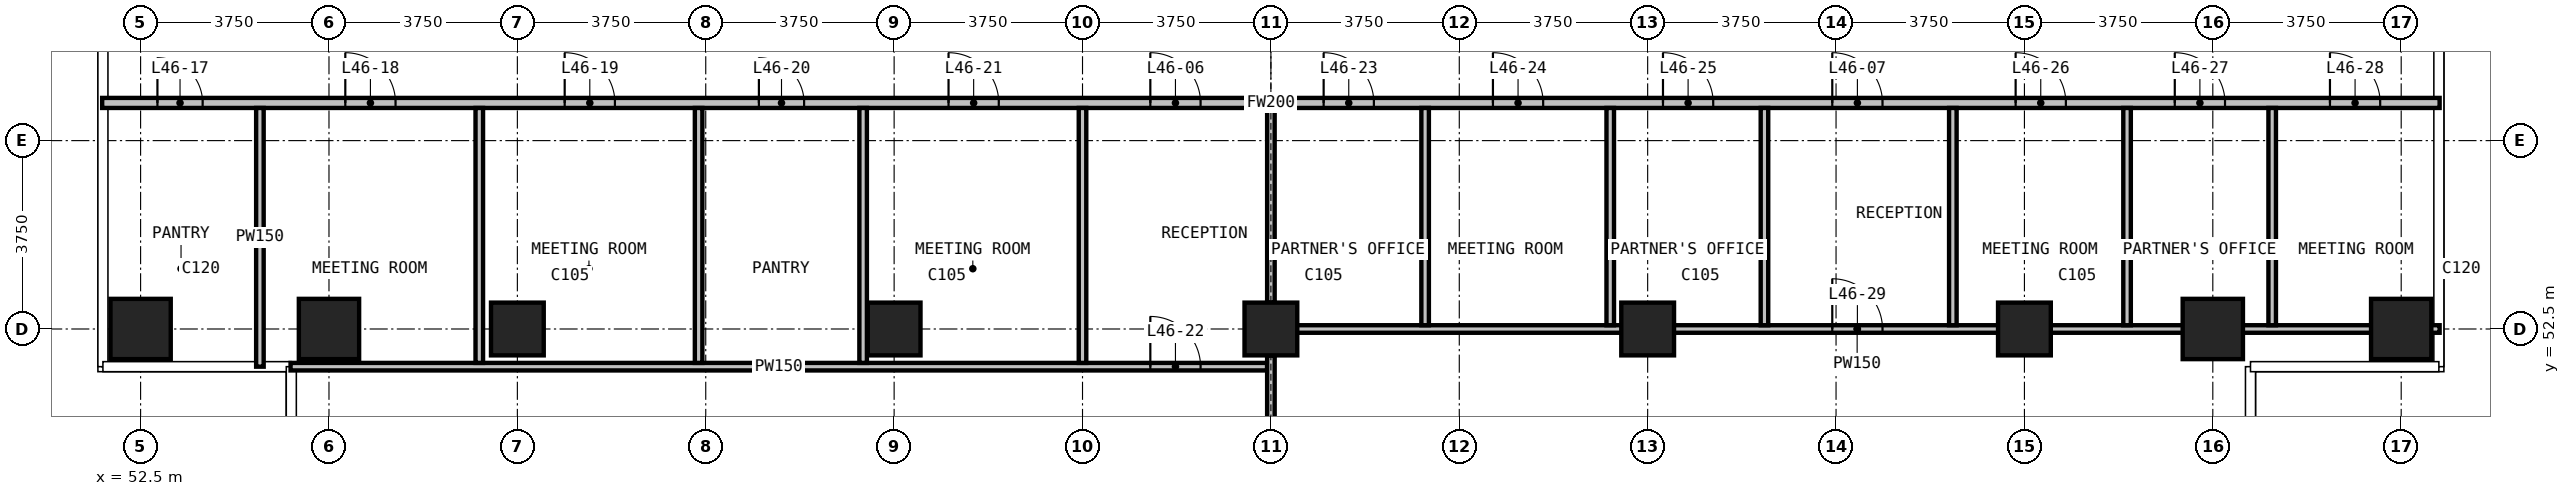
"""IFC4 building model, lengths in metres.
Left out: names, types, materials, properties, quantities, classifications, styles, units other than length and angle.
Written with IfcOpenShell. Run it as: python <this file> out.ifc"""

import sys

from ifc_helpers import new_model, si_unit, direction, frame, frame_2d, origin, origin_2d, place, context, subcontext, project, spatial, rectangle, extrude, element, fill, save


model = new_model("IFC4")
c1 = context("Model", 3, precision=1e-05, world=origin(), true_north=direction((0.0, 1.0)))
c2 = subcontext(c1, "Body", "Model", "MODEL_VIEW")
j1 = project(units=[si_unit("LENGTHUNIT", "METRE"), si_unit("PLANEANGLEUNIT", "RADIAN")], contexts=[c1])
p1 = place(None, origin())
s1 = spatial("IfcSite", under=j1, at=p1, CompositionType="ELEMENT")
p2 = place(p1, origin())
s2 = spatial("IfcBuilding", under=s1, at=p2, CompositionType="ELEMENT")
p3 = place(p2, frame((0.0, 0.0, 180.1)))
s3 = spatial("IfcBuildingStorey", under=s2, at=p3, CompositionType="ELEMENT", Elevation=180.1)
for number, where, z_axis, x_axis in (
    (1, (52.5, 52.5, 0.0), (0.0, 0.0, 1.0), (1.0, 0.0, 0.0)),
    (2, (56.25, 52.5, 0.0), (0.0, 0.0, 1.0), (1.0, 0.0, 0.0)),
):
    element("IfcColumn", number, at=place(p3, frame(where, z_axis=z_axis, x_axis=x_axis)), inside=s3, PredefinedType="COLUMN", context=c2, shape_type="SweptSolid", body=[
        extrude(rectangle(XDim=1.2, YDim=1.2, at=origin_2d()), origin(), (0.0, 0.0, 1.0), 3.6),
    ])
for number, where, z_axis, x_axis in (
    (3, (60.0, 52.5, 0.0), (0.0, 0.0, 1.0), (1.0, 0.0, 0.0)),
    (4, (67.5, 52.5, 0.0), (0.0, 0.0, 1.0), (1.0, 0.0, 0.0)),
    (5, (75.0, 52.5, 0.0), (0.0, 0.0, 1.0), (1.0, 0.0, 0.0)),
    (6, (82.5, 52.5, 0.0), (0.0, 0.0, 1.0), (1.0, 0.0, 0.0)),
    (7, (90.0, 52.5, 0.0), (0.0, 0.0, 1.0), (1.0, 0.0, 0.0)),
):
    element("IfcColumn", number, at=place(p3, frame(where, z_axis=z_axis, x_axis=x_axis)), inside=s3, PredefinedType="COLUMN", context=c2, shape_type="SweptSolid", body=[
        extrude(rectangle(XDim=1.05, YDim=1.05, at=origin_2d()), origin(), (0.0, 0.0, 1.0), 3.6),
    ])
for number, where, z_axis, x_axis in (
    (8, (93.75, 52.5, 0.0), (0.0, 0.0, 1.0), (1.0, 0.0, 0.0)),
    (9, (97.5, 52.5, 0.0), (0.0, 0.0, 1.0), (1.0, 0.0, 0.0)),
):
    element("IfcColumn", number, at=place(p3, frame(where, z_axis=z_axis, x_axis=x_axis)), inside=s3, PredefinedType="COLUMN", context=c2, shape_type="SweptSolid", body=[
        extrude(rectangle(XDim=1.2, YDim=1.2, at=origin_2d()), origin(), (0.0, 0.0, 1.0), 3.6),
    ])
p4 = place(p3, frame((51.735, 57.0, 0.0), z_axis=(0.0, 0.0, 1.0), x_axis=(1.0, 0.0, 0.0)))
e10 = element("IfcWall", 10, at=p4, inside=s3, PredefinedType="PARTITIONING", context=c2, shape_type="SweptSolid", body=[
    extrude(rectangle(XDim=46.53, YDim=0.2, at=frame_2d((23.265, 0.0))), origin(), (0.0, 0.0, 1.0), 3.25),
])
p5 = place(p4, frame((20.865, 0.0, 0.0)))
e11 = element("IfcOpeningElement", 11, at=p5, cuts=e10, PredefinedType="OPENING", context=c2, shape_type="SweptSolid", body=[
    extrude(rectangle(XDim=1.0, YDim=2.2, at=frame_2d((0.5, 1.1))), frame((0.0, 0.11, 0.0), z_axis=(0.0, -1.0, 0.0), x_axis=(1.0, 0.0, 0.0)), (0.0, 0.0, 1.0), 0.22),
])
p6 = place(p4, frame((34.44, 0.0, 0.0)))
e12 = element("IfcOpeningElement", 12, at=p6, cuts=e10, PredefinedType="OPENING", context=c2, shape_type="SweptSolid", body=[
    extrude(rectangle(XDim=1.0, YDim=2.2, at=frame_2d((0.5, 1.1))), frame((0.0, 0.11, 0.0), z_axis=(0.0, -1.0, 0.0), x_axis=(1.0, 0.0, 0.0)), (0.0, 0.0, 1.0), 0.22),
])
p7 = place(p4, frame((1.1, 0.0, 0.0)))
e13 = element("IfcOpeningElement", 13, at=p7, cuts=e10, PredefinedType="OPENING", context=c2, shape_type="SweptSolid", body=[
    extrude(rectangle(XDim=0.9, YDim=2.2, at=frame_2d((0.45, 1.1))), frame((0.0, 0.11, 0.0), z_axis=(0.0, -1.0, 0.0), x_axis=(1.0, 0.0, 0.0)), (0.0, 0.0, 1.0), 0.22),
])
p8 = place(p4, frame((4.84, 0.0, 0.0)))
e14 = element("IfcOpeningElement", 14, at=p8, cuts=e10, PredefinedType="OPENING", context=c2, shape_type="SweptSolid", body=[
    extrude(rectangle(XDim=1.0, YDim=2.2, at=frame_2d((0.5, 1.1))), frame((0.0, 0.11, 0.0), z_axis=(0.0, -1.0, 0.0), x_axis=(1.0, 0.0, 0.0)), (0.0, 0.0, 1.0), 0.22),
])
p9 = place(p4, frame((9.207, 0.0, 0.0)))
e15 = element("IfcOpeningElement", 15, at=p9, cuts=e10, PredefinedType="OPENING", context=c2, shape_type="SweptSolid", body=[
    extrude(rectangle(XDim=1.0, YDim=2.2, at=frame_2d((0.5, 1.1))), frame((0.0, 0.11, 0.0), z_axis=(0.0, -1.0, 0.0), x_axis=(1.0, 0.0, 0.0)), (0.0, 0.0, 1.0), 0.22),
])
p10 = place(p4, frame((13.073, 0.0, 0.0)))
e16 = element("IfcOpeningElement", 16, at=p10, cuts=e10, PredefinedType="OPENING", context=c2, shape_type="SweptSolid", body=[
    extrude(rectangle(XDim=0.9, YDim=2.2, at=frame_2d((0.45, 1.1))), frame((0.0, 0.11, 0.0), z_axis=(0.0, -1.0, 0.0), x_axis=(1.0, 0.0, 0.0)), (0.0, 0.0, 1.0), 0.22),
])
p11 = place(p4, frame((16.848, 0.0, 0.0)))
e17 = element("IfcOpeningElement", 17, at=p11, cuts=e10, PredefinedType="OPENING", context=c2, shape_type="SweptSolid", body=[
    extrude(rectangle(XDim=1.0, YDim=2.2, at=frame_2d((0.5, 1.1))), frame((0.0, 0.11, 0.0), z_axis=(0.0, -1.0, 0.0), x_axis=(1.0, 0.0, 0.0)), (0.0, 0.0, 1.0), 0.22),
])
p12 = place(p4, frame((24.315, 0.0, 0.0)))
e18 = element("IfcOpeningElement", 18, at=p12, cuts=e10, PredefinedType="OPENING", context=c2, shape_type="SweptSolid", body=[
    extrude(rectangle(XDim=1.0, YDim=2.2, at=frame_2d((0.5, 1.1))), frame((0.0, 0.11, 0.0), z_axis=(0.0, -1.0, 0.0), x_axis=(1.0, 0.0, 0.0)), (0.0, 0.0, 1.0), 0.22),
])
p13 = place(p4, frame((27.685, 0.0, 0.0)))
e19 = element("IfcOpeningElement", 19, at=p13, cuts=e10, PredefinedType="OPENING", context=c2, shape_type="SweptSolid", body=[
    extrude(rectangle(XDim=1.0, YDim=2.2, at=frame_2d((0.5, 1.1))), frame((0.0, 0.11, 0.0), z_axis=(0.0, -1.0, 0.0), x_axis=(1.0, 0.0, 0.0)), (0.0, 0.0, 1.0), 0.22),
])
p14 = place(p4, frame((31.07, 0.0, 0.0)))
e20 = element("IfcOpeningElement", 20, at=p14, cuts=e10, PredefinedType="OPENING", context=c2, shape_type="SweptSolid", body=[
    extrude(rectangle(XDim=1.0, YDim=2.2, at=frame_2d((0.5, 1.1))), frame((0.0, 0.11, 0.0), z_axis=(0.0, -1.0, 0.0), x_axis=(1.0, 0.0, 0.0)), (0.0, 0.0, 1.0), 0.22),
])
p15 = place(p4, frame((38.09, 0.0, 0.0)))
e21 = element("IfcOpeningElement", 21, at=p15, cuts=e10, PredefinedType="OPENING", context=c2, shape_type="SweptSolid", body=[
    extrude(rectangle(XDim=1.0, YDim=2.2, at=frame_2d((0.5, 1.1))), frame((0.0, 0.11, 0.0), z_axis=(0.0, -1.0, 0.0), x_axis=(1.0, 0.0, 0.0)), (0.0, 0.0, 1.0), 0.22),
])
p16 = place(p4, frame((41.258, 0.0, 0.0)))
e22 = element("IfcOpeningElement", 22, at=p16, cuts=e10, PredefinedType="OPENING", context=c2, shape_type="SweptSolid", body=[
    extrude(rectangle(XDim=1.0, YDim=2.2, at=frame_2d((0.5, 1.1))), frame((0.0, 0.11, 0.0), z_axis=(0.0, -1.0, 0.0), x_axis=(1.0, 0.0, 0.0)), (0.0, 0.0, 1.0), 0.22),
])
p17 = place(p4, frame((44.347, 0.0, 0.0)))
e23 = element("IfcOpeningElement", 23, at=p17, cuts=e10, PredefinedType="OPENING", context=c2, shape_type="SweptSolid", body=[
    extrude(rectangle(XDim=1.0, YDim=2.2, at=frame_2d((0.5, 1.1))), frame((0.0, 0.11, 0.0), z_axis=(0.0, -1.0, 0.0), x_axis=(1.0, 0.0, 0.0)), (0.0, 0.0, 1.0), 0.22),
])
p18 = place(p3, frame((55.485, 51.75, 0.0), z_axis=(0.0, 0.0, 1.0), x_axis=(1.0, 0.0, 0.0)))
e24 = element("IfcWall", 24, at=p18, inside=s3, PredefinedType="PARTITIONING", context=c2, shape_type="SweptSolid", body=[
    extrude(rectangle(XDim=19.44, YDim=0.15, at=frame_2d((9.72, 0.0))), origin(), (0.0, 0.0, 1.0), 3.25),
])
p19 = place(p18, frame((17.115, 0.0, 0.0)))
e25 = element("IfcOpeningElement", 25, at=p19, cuts=e24, PredefinedType="OPENING", context=c2, shape_type="SweptSolid", body=[
    extrude(rectangle(XDim=1.0, YDim=2.2, at=frame_2d((0.5, 1.1))), frame((0.0, 0.085, 0.0), z_axis=(0.0, -1.0, 0.0), x_axis=(1.0, 0.0, 0.0)), (0.0, 0.0, 1.0), 0.17),
])
p20 = place(p3, frame((75.075, 52.5, 0.0), z_axis=(0.0, 0.0, 1.0), x_axis=(1.0, 0.0, 0.0)))
e26 = element("IfcWall", 26, at=p20, inside=s3, PredefinedType="PARTITIONING", context=c2, shape_type="SweptSolid", body=[
    extrude(rectangle(XDim=23.19, YDim=0.15, at=frame_2d((11.595, 0.0))), origin(), (0.0, 0.0, 1.0), 3.25),
])
p21 = place(p20, frame((11.1, 0.0, 0.0)))
e27 = element("IfcOpeningElement", 27, at=p21, cuts=e26, PredefinedType="OPENING", context=c2, shape_type="SweptSolid", body=[
    extrude(rectangle(XDim=1.0, YDim=2.2, at=frame_2d((0.5, 1.1))), frame((0.0, 0.085, 0.0), z_axis=(0.0, -1.0, 0.0), x_axis=(1.0, 0.0, 0.0)), (0.0, 0.0, 1.0), 0.17),
])
p22 = place(p3, frame((54.875, 51.75, 0.0), z_axis=(0.0, 0.0, 1.0), x_axis=(0.0, 1.0, 0.0)))
e28 = element("IfcWall", 28, at=p22, inside=s3, PredefinedType="PARTITIONING", context=c2, shape_type="SweptSolid", body=[
    extrude(rectangle(XDim=5.15, YDim=0.15, at=frame_2d((2.575, 0.0))), origin(), (0.0, 0.0, 1.0), 3.25),
])
for number, where, z_axis, x_axis in (
    (29, (59.242, 51.825, 0.0), (0.0, 0.0, 1.0), (0.0, 1.0, 0.0)),
    (30, (63.608, 51.825, 0.0), (0.0, 0.0, 1.0), (0.0, 1.0, 0.0)),
    (31, (66.883, 51.825, 0.0), (0.0, 0.0, 1.0), (0.0, 1.0, 0.0)),
    (32, (71.25, 51.825, 0.0), (0.0, 0.0, 1.0), (0.0, 1.0, 0.0)),
):
    element("IfcWall", number, at=place(p3, frame(where, z_axis=z_axis, x_axis=x_axis)), inside=s3, PredefinedType="PARTITIONING", context=c2, shape_type="SweptSolid", body=[
        extrude(rectangle(XDim=5.075, YDim=0.15, at=frame_2d((2.538, 0.0))), origin(), (0.0, 0.0, 1.0), 3.25),
    ])
p23 = place(p3, frame((75.0, 45.6, 0.0), z_axis=(0.0, 0.0, 1.0), x_axis=(0.0, 1.0, 0.0)))
e33 = element("IfcWall", 33, at=p23, inside=s3, PredefinedType="PARTITIONING", context=c2, shape_type="SweptSolid", body=[
    extrude(rectangle(XDim=6.376, YDim=0.15, at=frame_2d((3.188, 0.0))), origin(), (0.0, 0.0, 1.0), 2.35),
])
p24 = place(p3, frame((75.0, 51.976, 0.0), z_axis=(0.0, 0.0, 1.0), x_axis=(0.0, 1.0, 0.0)))
e34 = element("IfcWall", 34, at=p24, inside=s3, PredefinedType="PARTITIONING", context=c2, shape_type="SweptSolid", body=[
    extrude(rectangle(XDim=1.049, YDim=0.15, at=frame_2d((0.524, 0.0))), origin(), (0.0, 0.0, 1.0), 3.25),
])
p25 = place(p3, frame((75.0, 53.025, 0.0), z_axis=(0.0, 0.0, 1.0), x_axis=(0.0, 1.0, 0.0)))
e35 = element("IfcWall", 35, at=p25, inside=s3, PredefinedType="PARTITIONING", context=c2, shape_type="SweptSolid", body=[
    extrude(rectangle(XDim=3.875, YDim=0.15, at=frame_2d((1.938, 0.0))), origin(), (0.0, 0.0, 1.0), 2.35),
])
for number, where, z_axis, x_axis in (
    (36, (78.07, 52.575, 0.0), (0.0, 0.0, 1.0), (0.0, 1.0, 0.0)),
    (37, (81.755, 52.575, 0.0), (0.0, 0.0, 1.0), (0.0, 1.0, 0.0)),
    (38, (84.825, 52.575, 0.0), (0.0, 0.0, 1.0), (0.0, 1.0, 0.0)),
    (39, (88.575, 52.575, 0.0), (0.0, 0.0, 1.0), (0.0, 1.0, 0.0)),
    (40, (92.043, 52.575, 0.0), (0.0, 0.0, 1.0), (0.0, 1.0, 0.0)),
    (41, (94.932, 52.575, 0.0), (0.0, 0.0, 1.0), (0.0, 1.0, 0.0)),
):
    element("IfcWall", number, at=place(p3, frame(where, z_axis=z_axis, x_axis=x_axis)), inside=s3, PredefinedType="PARTITIONING", context=c2, shape_type="SweptSolid", body=[
        extrude(rectangle(XDim=4.325, YDim=0.15, at=frame_2d((2.163, 0.0))), origin(), (0.0, 0.0, 1.0), 3.25),
    ])
p26 = place(p5, origin())
e42 = element("IfcDoor", 42, at=p26, inside=s3, OperationType="SINGLE_SWING_LEFT", PredefinedType="DOOR", context=c2, shape_type="SweptSolid", body=[
    extrude(rectangle(XDim=1.0, YDim=2.2, at=frame_2d((0.5, 1.1))), frame((0.0, 0.025, 0.0), z_axis=(0.0, -1.0, 0.0), x_axis=(1.0, 0.0, 0.0)), (0.0, 0.0, 1.0), 0.05),
])
fill(e11, e42)
p27 = place(p6, origin())
e43 = element("IfcDoor", 43, at=p27, inside=s3, OperationType="SINGLE_SWING_LEFT", PredefinedType="DOOR", context=c2, shape_type="SweptSolid", body=[
    extrude(rectangle(XDim=1.0, YDim=2.2, at=frame_2d((0.5, 1.1))), frame((0.0, 0.025, 0.0), z_axis=(0.0, -1.0, 0.0), x_axis=(1.0, 0.0, 0.0)), (0.0, 0.0, 1.0), 0.05),
])
fill(e12, e43)
p28 = place(p7, origin())
e44 = element("IfcDoor", 44, at=p28, inside=s3, OperationType="SINGLE_SWING_LEFT", PredefinedType="DOOR", context=c2, shape_type="SweptSolid", body=[
    extrude(rectangle(XDim=0.9, YDim=2.2, at=frame_2d((0.45, 1.1))), frame((0.0, 0.025, 0.0), z_axis=(0.0, -1.0, 0.0), x_axis=(1.0, 0.0, 0.0)), (0.0, 0.0, 1.0), 0.05),
])
fill(e13, e44)
p29 = place(p8, origin())
e45 = element("IfcDoor", 45, at=p29, inside=s3, OperationType="SINGLE_SWING_LEFT", PredefinedType="DOOR", context=c2, shape_type="SweptSolid", body=[
    extrude(rectangle(XDim=1.0, YDim=2.2, at=frame_2d((0.5, 1.1))), frame((0.0, 0.025, 0.0), z_axis=(0.0, -1.0, 0.0), x_axis=(1.0, 0.0, 0.0)), (0.0, 0.0, 1.0), 0.05),
])
fill(e14, e45)
p30 = place(p9, origin())
e46 = element("IfcDoor", 46, at=p30, inside=s3, OperationType="SINGLE_SWING_RIGHT", PredefinedType="DOOR", context=c2, shape_type="SweptSolid", body=[
    extrude(rectangle(XDim=1.0, YDim=2.2, at=frame_2d((0.5, 1.1))), frame((0.0, 0.025, 0.0), z_axis=(0.0, -1.0, 0.0), x_axis=(1.0, 0.0, 0.0)), (0.0, 0.0, 1.0), 0.05),
])
fill(e15, e46)
p31 = place(p10, origin())
e47 = element("IfcDoor", 47, at=p31, inside=s3, OperationType="SINGLE_SWING_LEFT", PredefinedType="DOOR", context=c2, shape_type="SweptSolid", body=[
    extrude(rectangle(XDim=0.9, YDim=2.2, at=frame_2d((0.45, 1.1))), frame((0.0, 0.025, 0.0), z_axis=(0.0, -1.0, 0.0), x_axis=(1.0, 0.0, 0.0)), (0.0, 0.0, 1.0), 0.05),
])
fill(e16, e47)
p32 = place(p11, origin())
e48 = element("IfcDoor", 48, at=p32, inside=s3, OperationType="SINGLE_SWING_LEFT", PredefinedType="DOOR", context=c2, shape_type="SweptSolid", body=[
    extrude(rectangle(XDim=1.0, YDim=2.2, at=frame_2d((0.5, 1.1))), frame((0.0, 0.025, 0.0), z_axis=(0.0, -1.0, 0.0), x_axis=(1.0, 0.0, 0.0)), (0.0, 0.0, 1.0), 0.05),
])
fill(e17, e48)
p33 = place(p19, origin())
e49 = element("IfcDoor", 49, at=p33, inside=s3, OperationType="SINGLE_SWING_LEFT", PredefinedType="DOOR", context=c2, shape_type="SweptSolid", body=[
    extrude(rectangle(XDim=1.0, YDim=2.2, at=frame_2d((0.5, 1.1))), frame((0.0, 0.025, 0.0), z_axis=(0.0, -1.0, 0.0), x_axis=(1.0, 0.0, 0.0)), (0.0, 0.0, 1.0), 0.05),
])
fill(e25, e49)
p34 = place(p12, origin())
e50 = element("IfcDoor", 50, at=p34, inside=s3, OperationType="SINGLE_SWING_LEFT", PredefinedType="DOOR", context=c2, shape_type="SweptSolid", body=[
    extrude(rectangle(XDim=1.0, YDim=2.2, at=frame_2d((0.5, 1.1))), frame((0.0, 0.025, 0.0), z_axis=(0.0, -1.0, 0.0), x_axis=(1.0, 0.0, 0.0)), (0.0, 0.0, 1.0), 0.05),
])
fill(e18, e50)
p35 = place(p13, origin())
e51 = element("IfcDoor", 51, at=p35, inside=s3, OperationType="SINGLE_SWING_LEFT", PredefinedType="DOOR", context=c2, shape_type="SweptSolid", body=[
    extrude(rectangle(XDim=1.0, YDim=2.2, at=frame_2d((0.5, 1.1))), frame((0.0, 0.025, 0.0), z_axis=(0.0, -1.0, 0.0), x_axis=(1.0, 0.0, 0.0)), (0.0, 0.0, 1.0), 0.05),
])
fill(e19, e51)
p36 = place(p14, origin())
e52 = element("IfcDoor", 52, at=p36, inside=s3, OperationType="SINGLE_SWING_LEFT", PredefinedType="DOOR", context=c2, shape_type="SweptSolid", body=[
    extrude(rectangle(XDim=1.0, YDim=2.2, at=frame_2d((0.5, 1.1))), frame((0.0, 0.025, 0.0), z_axis=(0.0, -1.0, 0.0), x_axis=(1.0, 0.0, 0.0)), (0.0, 0.0, 1.0), 0.05),
])
fill(e20, e52)
p37 = place(p15, origin())
e53 = element("IfcDoor", 53, at=p37, inside=s3, OperationType="SINGLE_SWING_RIGHT", PredefinedType="DOOR", context=c2, shape_type="SweptSolid", body=[
    extrude(rectangle(XDim=1.0, YDim=2.2, at=frame_2d((0.5, 1.1))), frame((0.0, 0.025, 0.0), z_axis=(0.0, -1.0, 0.0), x_axis=(1.0, 0.0, 0.0)), (0.0, 0.0, 1.0), 0.05),
])
fill(e21, e53)
p38 = place(p16, origin())
e54 = element("IfcDoor", 54, at=p38, inside=s3, OperationType="SINGLE_SWING_LEFT", PredefinedType="DOOR", context=c2, shape_type="SweptSolid", body=[
    extrude(rectangle(XDim=1.0, YDim=2.2, at=frame_2d((0.5, 1.1))), frame((0.0, 0.025, 0.0), z_axis=(0.0, -1.0, 0.0), x_axis=(1.0, 0.0, 0.0)), (0.0, 0.0, 1.0), 0.05),
])
fill(e22, e54)
p39 = place(p17, origin())
e55 = element("IfcDoor", 55, at=p39, inside=s3, OperationType="SINGLE_SWING_LEFT", PredefinedType="DOOR", context=c2, shape_type="SweptSolid", body=[
    extrude(rectangle(XDim=1.0, YDim=2.2, at=frame_2d((0.5, 1.1))), frame((0.0, 0.025, 0.0), z_axis=(0.0, -1.0, 0.0), x_axis=(1.0, 0.0, 0.0)), (0.0, 0.0, 1.0), 0.05),
])
fill(e23, e55)
p40 = place(p21, origin())
e56 = element("IfcDoor", 56, at=p40, inside=s3, OperationType="SINGLE_SWING_LEFT", PredefinedType="DOOR", context=c2, shape_type="SweptSolid", body=[
    extrude(rectangle(XDim=1.0, YDim=2.2, at=frame_2d((0.5, 1.1))), frame((0.0, 0.025, 0.0), z_axis=(0.0, -1.0, 0.0), x_axis=(1.0, 0.0, 0.0)), (0.0, 0.0, 1.0), 0.05),
])
fill(e27, e56)
save(model, sys.argv[1])
